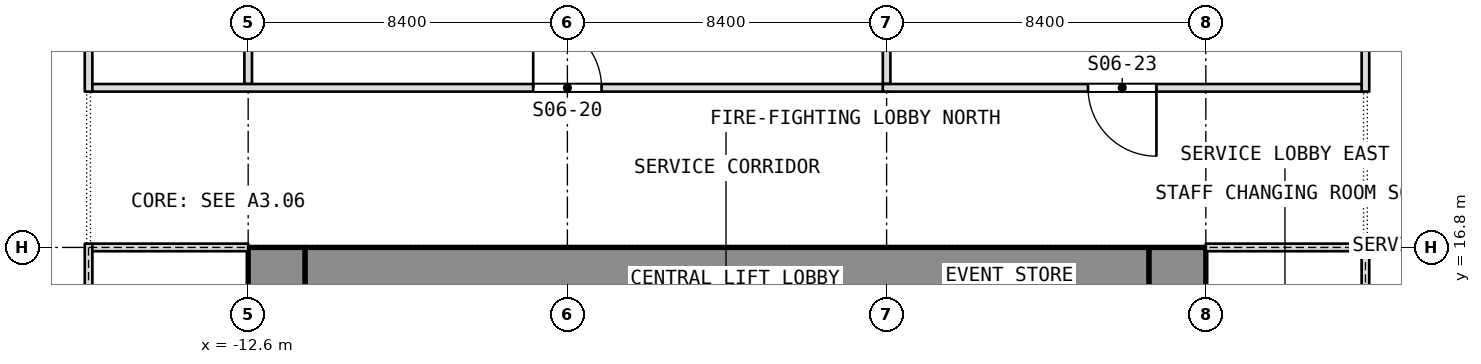
"""IFC4 building model, lengths in metres.
Left out: names, types, materials, properties, quantities, classifications, styles, units other than length and angle.
Written with IfcOpenShell. Run it as: python <this file> out.ifc"""

import sys

from ifc_helpers import new_model, si_unit, direction, frame, frame_2d, origin, place, context, subcontext, project, spatial, rectangle, extrude, element, fill, save


model = new_model("IFC4")
c1 = context("Model", 3, precision=1e-05, world=origin(), true_north=direction((0.0, 1.0)))
c2 = subcontext(c1, "Body", "Model", "MODEL_VIEW")
j1 = project(units=[si_unit("LENGTHUNIT", "METRE"), si_unit("PLANEANGLEUNIT", "RADIAN")], contexts=[c1])
p1 = place(None, origin())
s1 = spatial("IfcSite", under=j1, at=p1, CompositionType="ELEMENT")
p2 = place(p1, origin())
s2 = spatial("IfcBuilding", under=s1, at=p2, CompositionType="ELEMENT")
p3 = place(p2, frame((0.0, 0.0, 31.0)))
s3 = spatial("IfcBuildingStorey", under=s2, at=p3, CompositionType="ELEMENT", Elevation=31.0)
p4 = place(p3, frame((11.85, 0.0, 0.0), z_axis=(0.0, 0.0, 1.0), x_axis=(0.0, 1.0, 0.0)))
e1 = element("IfcWall", 1, at=p4, inside=s3, PredefinedType="SHEAR", context=c2, shape_type="SweptSolid", body=[
    extrude(rectangle(XDim=16.8, YDim=1.5, at=frame_2d((8.4, 0.0))), origin(), (0.0, 0.0, 1.0), 5.5),
])
p5 = place(p4, frame((1.688, 0.0, 0.0)))
e2 = element("IfcOpeningElement", 2, at=p5, cuts=e1, PredefinedType="OPENING", context=c2, shape_type="SweptSolid", body=[
    extrude(rectangle(XDim=0.9, YDim=2.1, at=frame_2d((0.45, 1.05))), frame((0.0, 0.75, 0.0), z_axis=(0.0, -1.0, 0.0), x_axis=(1.0, 0.0, 0.0)), (0.0, 0.0, 1.0), 1.5),
])
p6 = place(p4, frame((4.312, 0.0, 0.0)))
e3 = element("IfcOpeningElement", 3, at=p6, cuts=e1, PredefinedType="OPENING", context=c2, shape_type="SweptSolid", body=[
    extrude(rectangle(XDim=0.9, YDim=2.1, at=frame_2d((0.45, 1.05))), frame((0.0, 0.75, 0.0), z_axis=(0.0, -1.0, 0.0), x_axis=(1.0, 0.0, 0.0)), (0.0, 0.0, 1.0), 1.5),
])
p7 = place(p4, frame((6.825, 0.0, 0.0)))
e4 = element("IfcOpeningElement", 4, at=p7, cuts=e1, PredefinedType="OPENING", context=c2, shape_type="SweptSolid", body=[
    extrude(rectangle(XDim=1.2, YDim=2.1, at=frame_2d((0.6, 1.05))), frame((0.0, 0.75, 0.0), z_axis=(0.0, -1.0, 0.0), x_axis=(1.0, 0.0, 0.0)), (0.0, 0.0, 1.0), 1.5),
])
p8 = place(p4, frame((12.3, 0.0, 0.0)))
e5 = element("IfcOpeningElement", 5, at=p8, cuts=e1, PredefinedType="OPENING", context=c2, shape_type="SweptSolid", body=[
    extrude(rectangle(XDim=0.9, YDim=2.1, at=frame_2d((0.45, 1.05))), frame((0.0, 0.75, 0.0), z_axis=(0.0, -1.0, 0.0), x_axis=(1.0, 0.0, 0.0)), (0.0, 0.0, 1.0), 1.5),
])
p9 = place(p4, frame((8.775, 0.0, 0.0)))
e6 = element("IfcOpeningElement", 6, at=p9, cuts=e1, PredefinedType="OPENING", context=c2, shape_type="SweptSolid", body=[
    extrude(rectangle(XDim=1.2, YDim=2.1, at=frame_2d((0.6, 1.05))), frame((0.0, 0.75, 0.0), z_axis=(0.0, -1.0, 0.0), x_axis=(1.0, 0.0, 0.0)), (0.0, 0.0, 1.0), 1.5),
])
p10 = place(p3, frame((-11.85, 0.0, 0.0), z_axis=(0.0, 0.0, 1.0), x_axis=(0.0, 1.0, 0.0)))
e7 = element("IfcWall", 7, at=p10, inside=s3, PredefinedType="SHEAR", context=c2, shape_type="SweptSolid", body=[
    extrude(rectangle(XDim=16.8, YDim=1.5, at=frame_2d((8.4, 0.0))), origin(), (0.0, 0.0, 1.0), 5.5),
])
p11 = place(p10, frame((2.3, 0.0, 0.0)))
e8 = element("IfcOpeningElement", 8, at=p11, cuts=e7, PredefinedType="OPENING", context=c2, shape_type="SweptSolid", body=[
    extrude(rectangle(XDim=1.1, YDim=2.1, at=frame_2d((0.55, 1.05))), frame((0.0, 0.75, 0.0), z_axis=(0.0, -1.0, 0.0), x_axis=(1.0, 0.0, 0.0)), (0.0, 0.0, 1.0), 1.5),
])
p12 = place(p10, frame((4.85, 0.0, 0.0)))
e9 = element("IfcOpeningElement", 9, at=p12, cuts=e7, PredefinedType="OPENING", context=c2, shape_type="SweptSolid", body=[
    extrude(rectangle(XDim=1.1, YDim=2.1, at=frame_2d((0.55, 1.05))), frame((0.0, 0.75, 0.0), z_axis=(0.0, -1.0, 0.0), x_axis=(1.0, 0.0, 0.0)), (0.0, 0.0, 1.0), 1.5),
])
p13 = place(p10, frame((6.825, 0.0, 0.0)))
e10 = element("IfcOpeningElement", 10, at=p13, cuts=e7, PredefinedType="OPENING", context=c2, shape_type="SweptSolid", body=[
    extrude(rectangle(XDim=1.2, YDim=2.1, at=frame_2d((0.6, 1.05))), frame((0.0, 0.75, 0.0), z_axis=(0.0, -1.0, 0.0), x_axis=(1.0, 0.0, 0.0)), (0.0, 0.0, 1.0), 1.5),
])
p14 = place(p10, frame((13.4, 0.0, 0.0)))
e11 = element("IfcOpeningElement", 11, at=p14, cuts=e7, PredefinedType="OPENING", context=c2, shape_type="SweptSolid", body=[
    extrude(rectangle(XDim=1.1, YDim=2.1, at=frame_2d((0.55, 1.05))), frame((0.0, 0.75, 0.0), z_axis=(0.0, -1.0, 0.0), x_axis=(1.0, 0.0, 0.0)), (0.0, 0.0, 1.0), 1.5),
])
p15 = place(p10, frame((10.85, 0.0, 0.0)))
e12 = element("IfcOpeningElement", 12, at=p15, cuts=e7, PredefinedType="OPENING", context=c2, shape_type="SweptSolid", body=[
    extrude(rectangle(XDim=1.1, YDim=2.1, at=frame_2d((0.55, 1.05))), frame((0.0, 0.75, 0.0), z_axis=(0.0, -1.0, 0.0), x_axis=(1.0, 0.0, 0.0)), (0.0, 0.0, 1.0), 1.5),
])
p16 = place(p10, frame((8.775, 0.0, 0.0)))
e13 = element("IfcOpeningElement", 13, at=p16, cuts=e7, PredefinedType="OPENING", context=c2, shape_type="SweptSolid", body=[
    extrude(rectangle(XDim=1.2, YDim=2.1, at=frame_2d((0.6, 1.05))), frame((0.0, 0.75, 0.0), z_axis=(0.0, -1.0, 0.0), x_axis=(1.0, 0.0, 0.0)), (0.0, 0.0, 1.0), 1.5),
])
p17 = place(p3, frame((-11.1, 16.05, 0.0), z_axis=(0.0, 0.0, 1.0), x_axis=(1.0, 0.0, 0.0)))
e14 = element("IfcWall", 14, at=p17, inside=s3, PredefinedType="SHEAR", context=c2, shape_type="SweptSolid", body=[
    extrude(rectangle(XDim=22.2, YDim=1.5, at=frame_2d((11.1, 0.0))), origin(), (0.0, 0.0, 1.0), 5.5),
])
p18 = place(p3, frame((16.8, 20.9, 0.0), z_axis=(0.0, 0.0, 1.0), x_axis=(0.0, 1.0, 0.0)))
e15 = element("IfcWall", 15, at=p18, inside=s3, PredefinedType="PARTITIONING", context=c2, shape_type="SweptSolid", body=[
    extrude(rectangle(XDim=15.0, YDim=0.2, at=frame_2d((7.5, 0.0))), origin(), (0.0, 0.0, 1.0), 4.95),
])
p19 = place(p3, frame((4.2, 21.1, 0.0), z_axis=(0.0, 0.0, 1.0), x_axis=(0.0, 1.0, 0.0)))
e16 = element("IfcWall", 16, at=p19, inside=s3, PredefinedType="PARTITIONING", context=c2, shape_type="SweptSolid", body=[
    extrude(rectangle(XDim=10.73, YDim=0.2, at=frame_2d((5.365, 0.0))), origin(), (0.0, 0.0, 1.0), 4.95),
])
p20 = place(p3, frame((-12.6, 21.1, 0.0), z_axis=(0.0, 0.0, 1.0), x_axis=(0.0, 1.0, 0.0)))
e17 = element("IfcWall", 17, at=p20, inside=s3, PredefinedType="PARTITIONING", context=c2, shape_type="SweptSolid", body=[
    extrude(rectangle(XDim=11.033, YDim=0.2, at=frame_2d((5.517, 0.0))), origin(), (0.0, 0.0, 1.0), 4.95),
])
p21 = place(p3, frame((-16.8, 20.9, 0.0), z_axis=(0.0, 0.0, 1.0), x_axis=(0.0, 1.0, 0.0)))
e18 = element("IfcWall", 18, at=p21, inside=s3, PredefinedType="PARTITIONING", context=c2, shape_type="SweptSolid", body=[
    extrude(rectangle(XDim=13.8, YDim=0.2, at=frame_2d((6.9, 0.0))), origin(), (0.0, 0.0, 1.0), 4.95),
])
p22 = place(p21, frame((2.5, 0.0, 0.0)))
e19 = element("IfcOpeningElement", 19, at=p22, cuts=e18, PredefinedType="OPENING", context=c2, shape_type="SweptSolid", body=[
    extrude(rectangle(XDim=1.0, YDim=2.1, at=frame_2d((0.5, 1.05))), frame((0.0, 0.1, 0.0), z_axis=(0.0, -1.0, 0.0), x_axis=(1.0, 0.0, 0.0)), (0.0, 0.0, 1.0), 0.2),
])
p23 = place(p3, frame((-16.7, 21.0, 0.0), z_axis=(0.0, 0.0, 1.0), x_axis=(1.0, 0.0, 0.0)))
e20 = element("IfcWall", 20, at=p23, inside=s3, PredefinedType="PARTITIONING", context=c2, shape_type="SweptSolid", body=[
    extrude(rectangle(XDim=21.0, YDim=0.2, at=frame_2d((10.5, 0.0))), origin(), (0.0, 0.0, 1.0), 5.35),
])
p24 = place(p23, frame((11.6, 0.0, 0.0)))
e21 = element("IfcOpeningElement", 21, at=p24, cuts=e20, PredefinedType="OPENING", context=c2, shape_type="SweptSolid", body=[
    extrude(rectangle(XDim=1.8, YDim=2.1, at=frame_2d((0.9, 1.05))), frame((0.0, 0.1, 0.0), z_axis=(0.0, -1.0, 0.0), x_axis=(1.0, 0.0, 0.0)), (0.0, 0.0, 1.0), 0.2),
])
p25 = place(p3, frame((4.1, 21.0, 0.0), z_axis=(0.0, 0.0, 1.0), x_axis=(1.0, 0.0, 0.0)))
e22 = element("IfcWall", 22, at=p25, inside=s3, PredefinedType="PARTITIONING", context=c2, shape_type="SweptSolid", body=[
    extrude(rectangle(XDim=12.6, YDim=0.2, at=frame_2d((6.3, 0.0))), origin(), (0.0, 0.0, 1.0), 5.35),
])
p26 = place(p25, frame((5.4, 0.0, 0.0)))
e23 = element("IfcOpeningElement", 23, at=p26, cuts=e22, PredefinedType="OPENING", context=c2, shape_type="SweptSolid", body=[
    extrude(rectangle(XDim=1.8, YDim=2.1, at=frame_2d((0.9, 1.05))), frame((0.0, 0.1, 0.0), z_axis=(0.0, -1.0, 0.0), x_axis=(1.0, 0.0, 0.0)), (0.0, 0.0, 1.0), 0.2),
])
p27 = place(p3, frame((-16.8, -0.1, 0.0), z_axis=(0.0, 0.0, 1.0), x_axis=(0.0, 1.0, 0.0)))
e24 = element("IfcWall", 24, at=p27, inside=s3, PredefinedType="PARTITIONING", context=c2, shape_type="SweptSolid", body=[
    extrude(rectangle(XDim=17.0, YDim=0.2, at=frame_2d((8.5, 0.0))), origin(), (0.0, 0.0, 1.0), 4.95),
])
p28 = place(p27, frame((1.9, 0.0, 0.0)))
e25 = element("IfcOpeningElement", 25, at=p28, cuts=e24, PredefinedType="OPENING", context=c2, shape_type="SweptSolid", body=[
    extrude(rectangle(XDim=2.4, YDim=2.1, at=frame_2d((1.2, 1.05))), frame((0.0, 0.1, 0.0), z_axis=(0.0, -1.0, 0.0), x_axis=(1.0, 0.0, 0.0)), (0.0, 0.0, 1.0), 0.2),
])
p29 = place(p27, frame((12.7, 0.0, 0.0)))
e26 = element("IfcOpeningElement", 26, at=p29, cuts=e24, PredefinedType="OPENING", context=c2, shape_type="SweptSolid", body=[
    extrude(rectangle(XDim=2.4, YDim=2.1, at=frame_2d((1.2, 1.05))), frame((0.0, 0.1, 0.0), z_axis=(0.0, -1.0, 0.0), x_axis=(1.0, 0.0, 0.0)), (0.0, 0.0, 1.0), 0.2),
])
p30 = place(p3, frame((-16.7, 16.8, 0.0), z_axis=(0.0, 0.0, 1.0), x_axis=(1.0, 0.0, 0.0)))
e27 = element("IfcWall", 27, at=p30, inside=s3, PredefinedType="PARTITIONING", context=c2, shape_type="SweptSolid", body=[
    extrude(rectangle(XDim=4.1, YDim=0.2, at=frame_2d((2.05, 0.0))), origin(), (0.0, 0.0, 1.0), 4.85),
])
p31 = place(p3, frame((16.8, -0.1, 0.0), z_axis=(0.0, 0.0, 1.0), x_axis=(0.0, 1.0, 0.0)))
e28 = element("IfcWall", 28, at=p31, inside=s3, PredefinedType="PARTITIONING", context=c2, shape_type="SweptSolid", body=[
    extrude(rectangle(XDim=17.0, YDim=0.2, at=frame_2d((8.5, 0.0))), origin(), (0.0, 0.0, 1.0), 4.95),
])
p32 = place(p31, frame((1.9, 0.0, 0.0)))
e29 = element("IfcOpeningElement", 29, at=p32, cuts=e28, PredefinedType="OPENING", context=c2, shape_type="SweptSolid", body=[
    extrude(rectangle(XDim=2.4, YDim=2.1, at=frame_2d((1.2, 1.05))), frame((0.0, 0.1, 0.0), z_axis=(0.0, -1.0, 0.0), x_axis=(1.0, 0.0, 0.0)), (0.0, 0.0, 1.0), 0.2),
])
p33 = place(p31, frame((12.7, 0.0, 0.0)))
e30 = element("IfcOpeningElement", 30, at=p33, cuts=e28, PredefinedType="OPENING", context=c2, shape_type="SweptSolid", body=[
    extrude(rectangle(XDim=2.4, YDim=2.1, at=frame_2d((1.2, 1.05))), frame((0.0, 0.1, 0.0), z_axis=(0.0, -1.0, 0.0), x_axis=(1.0, 0.0, 0.0)), (0.0, 0.0, 1.0), 0.2),
])
p34 = place(p3, frame((12.6, 16.8, 0.0), z_axis=(0.0, 0.0, 1.0), x_axis=(1.0, 0.0, 0.0)))
e31 = element("IfcWall", 31, at=p34, inside=s3, PredefinedType="PARTITIONING", context=c2, shape_type="SweptSolid", body=[
    extrude(rectangle(XDim=4.1, YDim=0.2, at=frame_2d((2.05, 0.0))), origin(), (0.0, 0.0, 1.0), 4.85),
])
p35 = place(p24, origin())
e32 = element("IfcDoor", 32, at=p35, inside=s3, OperationType="DOUBLE_DOOR_SINGLE_SWING", PredefinedType="DOOR", context=c2, shape_type="SweptSolid", body=[
    extrude(rectangle(XDim=1.8, YDim=2.1, at=frame_2d((0.9, 1.05))), frame((0.0, 0.025, 0.0), z_axis=(0.0, -1.0, 0.0), x_axis=(1.0, 0.0, 0.0)), (0.0, 0.0, 1.0), 0.05),
])
fill(e21, e32)
p36 = place(p26, origin())
e33 = element("IfcDoor", 33, at=p36, inside=s3, OperationType="DOUBLE_DOOR_SINGLE_SWING", PredefinedType="DOOR", context=c2, shape_type="SweptSolid", body=[
    extrude(rectangle(XDim=1.8, YDim=2.1, at=frame_2d((0.9, 1.05))), frame((0.0, 0.025, 0.0), z_axis=(0.0, -1.0, 0.0), x_axis=(1.0, 0.0, 0.0)), (0.0, 0.0, 1.0), 0.05),
])
fill(e23, e33)
save(model, sys.argv[1])
